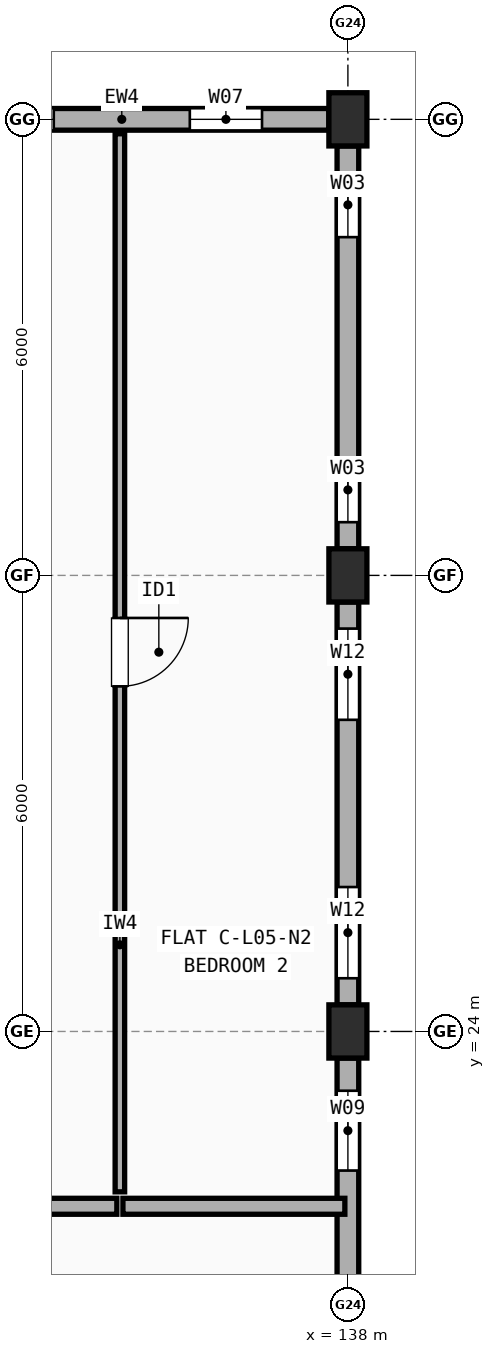
"""IFC4 building model, lengths in metres.
Left out: names, types, materials, properties, quantities, classifications, styles, units other than length and angle.
Written with IfcOpenShell. Run it as: python <this file> out.ifc"""

import sys

from ifc_helpers import new_model, si_unit, direction, frame, frame_2d, origin, origin_2d, place, context, subcontext, project, spatial, rectangle, extrude, element, fill, save


model = new_model("IFC4")
c1 = context("Model", 3, precision=1e-05, world=origin(), true_north=direction((0.0, 1.0)))
c2 = subcontext(c1, "Body", "Model", "MODEL_VIEW")
j1 = project(units=[si_unit("LENGTHUNIT", "METRE"), si_unit("PLANEANGLEUNIT", "RADIAN")], contexts=[c1])
p1 = place(None, origin())
s1 = spatial("IfcSite", under=j1, at=p1, CompositionType="ELEMENT")
p2 = place(p1, origin())
s2 = spatial("IfcBuilding", under=s1, at=p2, CompositionType="ELEMENT")
p3 = place(p2, frame((0.0, 0.0, 17.3)))
s3 = spatial("IfcBuildingStorey", under=s2, at=p3, CompositionType="ELEMENT", Elevation=17.3)
for number, where, z_axis, x_axis in (
    (1, (138.0, 24.0, 0.0), (0.0, 0.0, 1.0), (1.0, 0.0, 0.0)),
    (2, (138.0, 30.0, 0.0), (0.0, 0.0, 1.0), (1.0, 0.0, 0.0)),
    (3, (138.0, 36.0, 0.0), (0.0, 0.0, 1.0), (1.0, 0.0, 0.0)),
):
    element("IfcColumn", number, at=place(p3, frame(where, z_axis=z_axis, x_axis=x_axis)), inside=s3, PredefinedType="COLUMN", context=c2, shape_type="SweptSolid", body=[
        extrude(rectangle(XDim=0.5, YDim=0.7, at=origin_2d()), origin(), (0.0, 0.0, 1.0), 2.965),
    ])
p4 = place(p3, frame((138.0, 18.35, 0.0), z_axis=(0.0, 0.0, 1.0), x_axis=(0.0, 1.0, 0.0)))
e4 = element("IfcWall", 4, at=p4, inside=s3, PredefinedType="STANDARD", context=c2, shape_type="SweptSolid", body=[
    extrude(rectangle(XDim=5.3, YDim=0.285, at=frame_2d((2.65, 0.0))), origin(), (0.0, 0.0, 1.0), 2.447),
])
p5 = place(p4, frame((1.18, 0.0, 0.9)))
e5 = element("IfcOpeningElement", 5, at=p5, cuts=e4, PredefinedType="OPENING", context=c2, shape_type="SweptSolid", body=[
    extrude(rectangle(XDim=0.95, YDim=1.35, at=frame_2d((0.475, 0.675))), frame((0.0, 0.152, 0.0), z_axis=(0.0, -1.0, 0.0), x_axis=(1.0, 0.0, 0.0)), (0.0, 0.0, 1.0), 0.305),
])
p6 = place(p4, frame((3.82, 0.0, 0.9)))
e6 = element("IfcOpeningElement", 6, at=p6, cuts=e4, PredefinedType="OPENING", context=c2, shape_type="SweptSolid", body=[
    extrude(rectangle(XDim=1.05, YDim=1.35, at=frame_2d((0.525, 0.675))), frame((0.0, 0.152, 0.0), z_axis=(0.0, -1.0, 0.0), x_axis=(1.0, 0.0, 0.0)), (0.0, 0.0, 1.0), 0.305),
])
p7 = place(p3, frame((138.0, 24.35, 0.0), z_axis=(0.0, 0.0, 1.0), x_axis=(0.0, 1.0, 0.0)))
e7 = element("IfcWall", 7, at=p7, inside=s3, PredefinedType="STANDARD", context=c2, shape_type="SweptSolid", body=[
    extrude(rectangle(XDim=5.3, YDim=0.285, at=frame_2d((2.65, 0.0))), origin(), (0.0, 0.0, 1.0), 2.447),
])
p8 = place(p7, frame((0.35, 0.0, 0.9)))
e8 = element("IfcOpeningElement", 8, at=p8, cuts=e7, PredefinedType="OPENING", context=c2, shape_type="SweptSolid", body=[
    extrude(rectangle(XDim=1.2, YDim=1.35, at=frame_2d((0.6, 0.675))), frame((0.0, 0.152, 0.0), z_axis=(0.0, -1.0, 0.0), x_axis=(1.0, 0.0, 0.0)), (0.0, 0.0, 1.0), 0.305),
])
p9 = place(p7, frame((3.75, 0.0, 0.9)))
e9 = element("IfcOpeningElement", 9, at=p9, cuts=e7, PredefinedType="OPENING", context=c2, shape_type="SweptSolid", body=[
    extrude(rectangle(XDim=1.2, YDim=1.35, at=frame_2d((0.6, 0.675))), frame((0.0, 0.152, 0.0), z_axis=(0.0, -1.0, 0.0), x_axis=(1.0, 0.0, 0.0)), (0.0, 0.0, 1.0), 0.305),
])
p10 = place(p3, frame((138.0, 30.35, 0.0), z_axis=(0.0, 0.0, 1.0), x_axis=(0.0, 1.0, 0.0)))
e10 = element("IfcWall", 10, at=p10, inside=s3, PredefinedType="STANDARD", context=c2, shape_type="SweptSolid", body=[
    extrude(rectangle(XDim=5.3, YDim=0.285, at=frame_2d((2.65, 0.0))), origin(), (0.0, 0.0, 1.0), 2.447),
])
p11 = place(p10, frame((0.35, 0.0, 0.9)))
e11 = element("IfcOpeningElement", 11, at=p11, cuts=e10, PredefinedType="OPENING", context=c2, shape_type="SweptSolid", body=[
    extrude(rectangle(XDim=0.85, YDim=1.25, at=frame_2d((0.425, 0.625))), frame((0.0, 0.152, 0.0), z_axis=(0.0, -1.0, 0.0), x_axis=(1.0, 0.0, 0.0)), (0.0, 0.0, 1.0), 0.305),
])
p12 = place(p10, frame((4.1, 0.0, 0.9)))
e12 = element("IfcOpeningElement", 12, at=p12, cuts=e10, PredefinedType="OPENING", context=c2, shape_type="SweptSolid", body=[
    extrude(rectangle(XDim=0.85, YDim=1.25, at=frame_2d((0.425, 0.625))), frame((0.0, 0.152, 0.0), z_axis=(0.0, -1.0, 0.0), x_axis=(1.0, 0.0, 0.0)), (0.0, 0.0, 1.0), 0.305),
])
p13 = place(p3, frame((137.75, 36.0, 0.0), z_axis=(0.0, 0.0, 1.0), x_axis=(-1.0, 0.0, 0.0)))
e13 = element("IfcWall", 13, at=p13, inside=s3, PredefinedType="STANDARD", context=c2, shape_type="SweptSolid", body=[
    extrude(rectangle(XDim=5.5, YDim=0.285, at=frame_2d((2.75, 0.0))), origin(), (0.0, 0.0, 1.0), 2.447),
])
p14 = place(p13, frame((0.88, 0.0, 0.9)))
e14 = element("IfcOpeningElement", 14, at=p14, cuts=e13, PredefinedType="OPENING", context=c2, shape_type="SweptSolid", body=[
    extrude(rectangle(XDim=0.95, YDim=1.35, at=frame_2d((0.475, 0.675))), frame((0.0, 0.152, 0.0), z_axis=(0.0, -1.0, 0.0), x_axis=(1.0, 0.0, 0.0)), (0.0, 0.0, 1.0), 0.305),
])
p15 = place(p13, frame((3.62, 0.0, 0.9)))
e15 = element("IfcOpeningElement", 15, at=p15, cuts=e13, PredefinedType="OPENING", context=c2, shape_type="SweptSolid", body=[
    extrude(rectangle(XDim=1.05, YDim=1.35, at=frame_2d((0.525, 0.675))), frame((0.0, 0.152, 0.0), z_axis=(0.0, -1.0, 0.0), x_axis=(1.0, 0.0, 0.0)), (0.0, 0.0, 1.0), 0.305),
])
p16 = place(p3, frame((124.54, 21.7, 0.0), z_axis=(0.0, 0.0, 1.0), x_axis=(1.0, 0.0, 0.0)))
e16 = element("IfcWall", 16, at=p16, inside=s3, PredefinedType="SOLIDWALL", context=c2, shape_type="SweptSolid", body=[
    extrude(rectangle(XDim=10.42, YDim=0.21, at=frame_2d((5.21, 0.0))), origin(), (0.0, 0.0, 1.0), 2.447),
])
p17 = place(p16, frame((4.72, 0.0, 0.0)))
e17 = element("IfcOpeningElement", 17, at=p17, cuts=e16, PredefinedType="OPENING", context=c2, shape_type="SweptSolid", body=[
    extrude(rectangle(XDim=0.98, YDim=2.15, at=frame_2d((0.49, 1.075))), frame((0.0, 0.115, 0.0), z_axis=(0.0, -1.0, 0.0), x_axis=(1.0, 0.0, 0.0)), (0.0, 0.0, 1.0), 0.23),
])
p18 = place(p3, frame((135.04, 21.7, 0.0), z_axis=(0.0, 0.0, 1.0), x_axis=(1.0, 0.0, 0.0)))
e18 = element("IfcWall", 18, at=p18, inside=s3, PredefinedType="SOLIDWALL", context=c2, shape_type="SweptSolid", body=[
    extrude(rectangle(XDim=2.92, YDim=0.21, at=frame_2d((1.46, 0.0))), origin(), (0.0, 0.0, 1.0), 2.447),
])
p19 = place(p3, frame((135.0, 21.89, 0.0), z_axis=(0.0, 0.0, 1.0), x_axis=(0.0, 1.0, 0.0)))
e19 = element("IfcWall", 19, at=p19, inside=s3, PredefinedType="PARTITIONING", context=c2, shape_type="SweptSolid", body=[
    extrude(rectangle(XDim=13.92, YDim=0.125, at=frame_2d((6.96, 0.0))), origin(), (0.0, 0.0, 1.0), 2.447),
])
p20 = place(p19, frame((6.65, 0.0, 0.0)))
e20 = element("IfcOpeningElement", 20, at=p20, cuts=e19, PredefinedType="OPENING", context=c2, shape_type="SweptSolid", body=[
    extrude(rectangle(XDim=0.9, YDim=2.1, at=frame_2d((0.45, 1.05))), frame((0.0, 0.073, 0.0), z_axis=(0.0, -1.0, 0.0), x_axis=(1.0, 0.0, 0.0)), (0.0, 0.0, 1.0), 0.145),
])
p21 = place(p6, origin())
e21 = element("IfcWindow", 21, at=p21, inside=s3, PartitioningType="SINGLE_PANEL", PredefinedType="WINDOW", context=c2, shape_type="SweptSolid", body=[
    extrude(rectangle(XDim=1.05, YDim=1.35, at=frame_2d((0.525, 0.675))), frame((0.0, 0.03, 0.0), z_axis=(0.0, -1.0, 0.0), x_axis=(1.0, 0.0, 0.0)), (0.0, 0.0, 1.0), 0.06),
])
fill(e6, e21)
p22 = place(p8, origin())
e22 = element("IfcWindow", 22, at=p22, inside=s3, PartitioningType="SINGLE_PANEL", PredefinedType="WINDOW", context=c2, shape_type="SweptSolid", body=[
    extrude(rectangle(XDim=1.2, YDim=1.35, at=frame_2d((0.6, 0.675))), frame((0.0, 0.03, 0.0), z_axis=(0.0, -1.0, 0.0), x_axis=(1.0, 0.0, 0.0)), (0.0, 0.0, 1.0), 0.06),
])
fill(e8, e22)
p23 = place(p9, origin())
e23 = element("IfcWindow", 23, at=p23, inside=s3, PartitioningType="SINGLE_PANEL", PredefinedType="WINDOW", context=c2, shape_type="SweptSolid", body=[
    extrude(rectangle(XDim=1.2, YDim=1.35, at=frame_2d((0.6, 0.675))), frame((0.0, 0.03, 0.0), z_axis=(0.0, -1.0, 0.0), x_axis=(1.0, 0.0, 0.0)), (0.0, 0.0, 1.0), 0.06),
])
fill(e9, e23)
p24 = place(p11, origin())
e24 = element("IfcWindow", 24, at=p24, inside=s3, PartitioningType="SINGLE_PANEL", PredefinedType="WINDOW", context=c2, shape_type="SweptSolid", body=[
    extrude(rectangle(XDim=0.85, YDim=1.25, at=frame_2d((0.425, 0.625))), frame((0.0, 0.03, 0.0), z_axis=(0.0, -1.0, 0.0), x_axis=(1.0, 0.0, 0.0)), (0.0, 0.0, 1.0), 0.06),
])
fill(e11, e24)
p25 = place(p12, origin())
e25 = element("IfcWindow", 25, at=p25, inside=s3, PartitioningType="SINGLE_PANEL", PredefinedType="WINDOW", context=c2, shape_type="SweptSolid", body=[
    extrude(rectangle(XDim=0.85, YDim=1.25, at=frame_2d((0.425, 0.625))), frame((0.0, 0.03, 0.0), z_axis=(0.0, -1.0, 0.0), x_axis=(1.0, 0.0, 0.0)), (0.0, 0.0, 1.0), 0.06),
])
fill(e12, e25)
p26 = place(p14, origin())
e26 = element("IfcWindow", 26, at=p26, inside=s3, PartitioningType="SINGLE_PANEL", PredefinedType="WINDOW", context=c2, shape_type="SweptSolid", body=[
    extrude(rectangle(XDim=0.95, YDim=1.35, at=frame_2d((0.475, 0.675))), frame((0.0, 0.03, 0.0), z_axis=(0.0, -1.0, 0.0), x_axis=(1.0, 0.0, 0.0)), (0.0, 0.0, 1.0), 0.06),
])
fill(e14, e26)
p27 = place(p15, origin())
e27 = element("IfcWindow", 27, at=p27, inside=s3, PartitioningType="SINGLE_PANEL", PredefinedType="WINDOW", context=c2, shape_type="SweptSolid", body=[
    extrude(rectangle(XDim=1.05, YDim=1.35, at=frame_2d((0.525, 0.675))), frame((0.0, 0.03, 0.0), z_axis=(0.0, -1.0, 0.0), x_axis=(1.0, 0.0, 0.0)), (0.0, 0.0, 1.0), 0.06),
])
fill(e15, e27)
p28 = place(p20, origin())
e28 = element("IfcDoor", 28, at=p28, inside=s3, OperationType="SINGLE_SWING_RIGHT", PredefinedType="DOOR", context=c2, shape_type="SweptSolid", body=[
    extrude(rectangle(XDim=0.9, YDim=2.1, at=frame_2d((0.45, 1.05))), frame((0.0, 0.025, 0.0), z_axis=(0.0, -1.0, 0.0), x_axis=(1.0, 0.0, 0.0)), (0.0, 0.0, 1.0), 0.05),
])
fill(e20, e28)
save(model, sys.argv[1])
